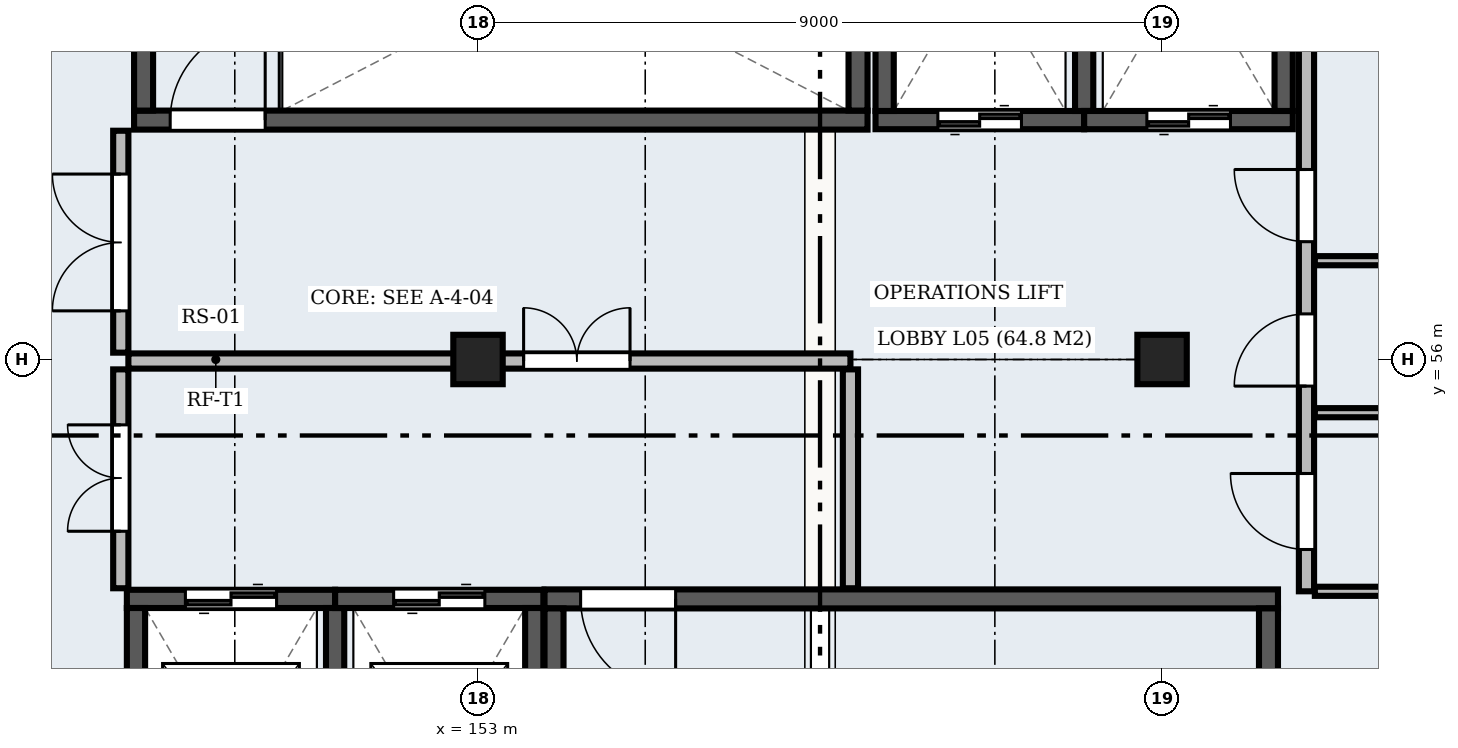
"""IFC4 building model, lengths in metres.
Left out: names, types, materials, properties, quantities, classifications, styles, units other than length and angle.
Written with IfcOpenShell. Run it as: python <this file> out.ifc"""

import sys

from ifc_helpers import new_model, si_unit, direction, frame, frame_2d, origin, origin_2d, place, context, subcontext, project, spatial, rectangle, extrude, element, fill, save


model = new_model("IFC4")
c1 = context("Model", 3, precision=1e-05, world=origin(), true_north=direction((0.0, 1.0)))
c2 = subcontext(c1, "Body", "Model", "MODEL_VIEW")
j1 = project(units=[si_unit("LENGTHUNIT", "METRE"), si_unit("PLANEANGLEUNIT", "RADIAN")], contexts=[c1])
p1 = place(None, origin())
s1 = spatial("IfcSite", under=j1, at=p1, CompositionType="ELEMENT")
p2 = place(p1, origin())
s2 = spatial("IfcBuilding", under=s1, at=p2, CompositionType="ELEMENT")
p3 = place(p2, frame((0.0, 0.0, 22.8)))
s3 = spatial("IfcBuildingStorey", under=s2, at=p3, CompositionType="ELEMENT", Elevation=22.8)
for number, where, z_axis, x_axis in (
    (1, (153.0, 56.0, 0.0), (0.0, 0.0, 1.0), (1.0, 0.0, 0.0)),
    (2, (162.0, 56.0, 0.0), (0.0, 0.0, 1.0), (1.0, 0.0, 0.0)),
):
    element("IfcColumn", number, at=place(p3, frame(where, z_axis=z_axis, x_axis=x_axis)), inside=s3, PredefinedType="COLUMN", context=c2, shape_type="SweptSolid", body=[
        extrude(rectangle(XDim=0.65, YDim=0.65, at=origin_2d()), origin(), (0.0, 0.0, 1.0), 6.58),
    ])
p4 = place(p3, frame((148.475, 59.15, 0.0), z_axis=(0.0, 0.0, 1.0), x_axis=(1.0, 0.0, 0.0)))
e3 = element("IfcWall", 3, at=p4, inside=s3, PredefinedType="SHEAR", context=c2, shape_type="SweptSolid", body=[
    extrude(rectangle(XDim=9.65, YDim=0.25, at=frame_2d((4.825, 0.0))), origin(), (0.0, 0.0, 1.0), 3.89),
])
p5 = place(p4, frame((0.475, 0.0, 0.0)))
e4 = element("IfcOpeningElement", 4, at=p5, cuts=e3, PredefinedType="OPENING", context=c2, shape_type="SweptSolid", body=[
    extrude(rectangle(XDim=1.25, YDim=2.15, at=frame_2d((0.625, 1.075))), frame((0.0, 0.137, 0.0), z_axis=(0.0, -1.0, 0.0), x_axis=(1.0, 0.0, 0.0)), (0.0, 0.0, 1.0), 0.274),
])
for number, where, z_axis, x_axis in (
    (5, (148.6, 63.125, 0.0), (0.0, 0.0, 1.0), (0.0, -1.0, 0.0)),
    (6, (158.0, 59.275, 0.0), (0.0, 0.0, 1.0), (0.0, 1.0, 0.0)),
):
    element("IfcWall", number, at=place(p3, frame(where, z_axis=z_axis, x_axis=x_axis)), inside=s3, PredefinedType="SHEAR", context=c2, shape_type="SweptSolid", body=[
        extrude(rectangle(XDim=3.85, YDim=0.25, at=frame_2d((1.925, 0.0))), origin(), (0.0, 0.0, 1.0), 3.89),
    ])
p6 = place(p3, frame((163.525, 52.85, 0.0), z_axis=(0.0, 0.0, 1.0), x_axis=(-1.0, 0.0, 0.0)))
e7 = element("IfcWall", 7, at=p6, inside=s3, PredefinedType="SHEAR", context=c2, shape_type="SweptSolid", body=[
    extrude(rectangle(XDim=9.65, YDim=0.25, at=frame_2d((4.825, 0.0))), origin(), (0.0, 0.0, 1.0), 3.89),
])
p7 = place(p6, frame((7.925, 0.0, 0.0)))
e8 = element("IfcOpeningElement", 8, at=p7, cuts=e7, PredefinedType="OPENING", context=c2, shape_type="SweptSolid", body=[
    extrude(rectangle(XDim=1.25, YDim=2.15, at=frame_2d((0.625, 1.075))), frame((0.0, 0.137, 0.0), z_axis=(0.0, -1.0, 0.0), x_axis=(1.0, 0.0, 0.0)), (0.0, 0.0, 1.0), 0.274),
])
for number, where, z_axis, x_axis in (
    (9, (154.0, 52.725, 0.0), (0.0, 0.0, 1.0), (0.0, -1.0, 0.0)),
    (10, (163.4, 48.875, 0.0), (0.0, 0.0, 1.0), (0.0, 1.0, 0.0)),
):
    element("IfcWall", number, at=place(p3, frame(where, z_axis=z_axis, x_axis=x_axis)), inside=s3, PredefinedType="SHEAR", context=c2, shape_type="SweptSolid", body=[
        extrude(rectangle(XDim=3.85, YDim=0.25, at=frame_2d((1.925, 0.0))), origin(), (0.0, 0.0, 1.0), 3.89),
    ])
p8 = place(p3, frame((158.23, 59.15, 0.0), z_axis=(0.0, 0.0, 1.0), x_axis=(1.0, 0.0, 0.0)))
e11 = element("IfcWall", 11, at=p8, inside=s3, PredefinedType="SHEAR", context=c2, shape_type="SweptSolid", body=[
    extrude(rectangle(XDim=2.745, YDim=0.24, at=frame_2d((1.373, 0.0))), origin(), (0.0, 0.0, 1.0), 3.89),
])
p9 = place(p8, frame((0.82, 0.0, 0.0)))
e12 = element("IfcOpeningElement", 12, at=p9, cuts=e11, PredefinedType="OPENING", context=c2, shape_type="SweptSolid", body=[
    extrude(rectangle(XDim=1.1, YDim=2.2, at=frame_2d((0.55, 1.1))), frame((0.0, 0.132, 0.0), z_axis=(0.0, -1.0, 0.0), x_axis=(1.0, 0.0, 0.0)), (0.0, 0.0, 1.0), 0.264),
])
for number, where, z_axis, x_axis in (
    (13, (158.35, 63.13, 0.0), (0.0, 0.0, 1.0), (0.0, -1.0, 0.0)),
    (14, (160.975, 59.27, 0.0), (0.0, 0.0, 1.0), (0.0, 1.0, 0.0)),
):
    element("IfcWall", number, at=place(p3, frame(where, z_axis=z_axis, x_axis=x_axis)), inside=s3, PredefinedType="SHEAR", context=c2, shape_type="SweptSolid", body=[
        extrude(rectangle(XDim=3.86, YDim=0.24, at=frame_2d((1.93, 0.0))), origin(), (0.0, 0.0, 1.0), 3.89),
    ])
p10 = place(p3, frame((160.975, 59.15, 0.0), z_axis=(0.0, 0.0, 1.0), x_axis=(1.0, 0.0, 0.0)))
e15 = element("IfcWall", 15, at=p10, inside=s3, PredefinedType="SHEAR", context=c2, shape_type="SweptSolid", body=[
    extrude(rectangle(XDim=2.745, YDim=0.24, at=frame_2d((1.373, 0.0))), origin(), (0.0, 0.0, 1.0), 3.89),
])
p11 = place(p10, frame((0.825, 0.0, 0.0)))
e16 = element("IfcOpeningElement", 16, at=p11, cuts=e15, PredefinedType="OPENING", context=c2, shape_type="SweptSolid", body=[
    extrude(rectangle(XDim=1.1, YDim=2.2, at=frame_2d((0.55, 1.1))), frame((0.0, 0.132, 0.0), z_axis=(0.0, -1.0, 0.0), x_axis=(1.0, 0.0, 0.0)), (0.0, 0.0, 1.0), 0.264),
])
p12 = place(p3, frame((163.6, 59.27, 0.0), z_axis=(0.0, 0.0, 1.0), x_axis=(0.0, 1.0, 0.0)))
e17 = element("IfcWall", 17, at=p12, inside=s3, PredefinedType="SHEAR", context=c2, shape_type="SweptSolid", body=[
    extrude(rectangle(XDim=3.86, YDim=0.24, at=frame_2d((1.93, 0.0))), origin(), (0.0, 0.0, 1.0), 3.89),
])
p13 = place(p3, frame((151.12, 52.85, 0.0), z_axis=(0.0, 0.0, 1.0), x_axis=(-1.0, 0.0, 0.0)))
e18 = element("IfcWall", 18, at=p13, inside=s3, PredefinedType="SHEAR", context=c2, shape_type="SweptSolid", body=[
    extrude(rectangle(XDim=2.74, YDim=0.24, at=frame_2d((1.37, 0.0))), origin(), (0.0, 0.0, 1.0), 3.89),
])
p14 = place(p13, frame((0.77, 0.0, 0.0)))
e19 = element("IfcOpeningElement", 19, at=p14, cuts=e18, PredefinedType="OPENING", context=c2, shape_type="SweptSolid", body=[
    extrude(rectangle(XDim=1.2, YDim=2.2, at=frame_2d((0.6, 1.1))), frame((0.0, 0.132, 0.0), z_axis=(0.0, -1.0, 0.0), x_axis=(1.0, 0.0, 0.0)), (0.0, 0.0, 1.0), 0.264),
])
for number, where, z_axis, x_axis in (
    (20, (148.5, 52.73, 0.0), (0.0, 0.0, 1.0), (0.0, -1.0, 0.0)),
    (21, (151.12, 48.87, 0.0), (0.0, 0.0, 1.0), (0.0, 1.0, 0.0)),
):
    element("IfcWall", number, at=place(p3, frame(where, z_axis=z_axis, x_axis=x_axis)), inside=s3, PredefinedType="SHEAR", context=c2, shape_type="SweptSolid", body=[
        extrude(rectangle(XDim=3.86, YDim=0.24, at=frame_2d((1.93, 0.0))), origin(), (0.0, 0.0, 1.0), 3.89),
    ])
p15 = place(p3, frame((153.86, 52.85, 0.0), z_axis=(0.0, 0.0, 1.0), x_axis=(-1.0, 0.0, 0.0)))
e22 = element("IfcWall", 22, at=p15, inside=s3, PredefinedType="SHEAR", context=c2, shape_type="SweptSolid", body=[
    extrude(rectangle(XDim=2.74, YDim=0.24, at=frame_2d((1.37, 0.0))), origin(), (0.0, 0.0, 1.0), 3.89),
])
p16 = place(p15, frame((0.77, 0.0, 0.0)))
e23 = element("IfcOpeningElement", 23, at=p16, cuts=e22, PredefinedType="OPENING", context=c2, shape_type="SweptSolid", body=[
    extrude(rectangle(XDim=1.2, YDim=2.2, at=frame_2d((0.6, 1.1))), frame((0.0, 0.132, 0.0), z_axis=(0.0, -1.0, 0.0), x_axis=(1.0, 0.0, 0.0)), (0.0, 0.0, 1.0), 0.264),
])
p17 = place(p3, frame((153.74, 48.87, 0.0), z_axis=(0.0, 0.0, 1.0), x_axis=(0.0, 1.0, 0.0)))
e24 = element("IfcWall", 24, at=p17, inside=s3, PredefinedType="SHEAR", context=c2, shape_type="SweptSolid", body=[
    extrude(rectangle(XDim=3.86, YDim=0.24, at=frame_2d((1.93, 0.0))), origin(), (0.0, 0.0, 1.0), 3.89),
])
p18 = place(p3, frame((148.4, 55.98, 0.0), z_axis=(0.0, 0.0, 1.0), x_axis=(1.0, 0.0, 0.0)))
e25 = element("IfcWall", 25, at=p18, inside=s3, PredefinedType="STANDARD", context=c2, shape_type="SweptSolid", body=[
    extrude(rectangle(XDim=9.5, YDim=0.2, at=frame_2d((4.75, 0.0))), origin(), (0.0, 0.0, 1.0), 3.32),
])
p19 = place(p18, frame((5.2, 0.0, 0.0)))
e26 = element("IfcOpeningElement", 26, at=p19, cuts=e25, PredefinedType="OPENING", context=c2, shape_type="SweptSolid", body=[
    extrude(rectangle(XDim=1.4, YDim=2.2, at=frame_2d((0.7, 1.1))), frame((0.0, 0.112, 0.0), z_axis=(0.0, -1.0, 0.0), x_axis=(1.0, 0.0, 0.0)), (0.0, 0.0, 1.0), 0.224),
])
p20 = place(p3, frame((157.9, 52.99, 0.0), z_axis=(0.0, 0.0, 1.0), x_axis=(0.0, 1.0, 0.0)))
e27 = element("IfcWall", 27, at=p20, inside=s3, PredefinedType="STANDARD", context=c2, shape_type="SweptSolid", body=[
    extrude(rectangle(XDim=2.88, YDim=0.2, at=frame_2d((1.44, 0.0))), origin(), (0.0, 0.0, 1.0), 3.89),
])
p21 = place(p3, frame((148.3, 52.99, 0.0), z_axis=(0.0, 0.0, 1.0), x_axis=(0.0, 1.0, 0.0)))
e28 = element("IfcWall", 28, at=p21, inside=s3, PredefinedType="STANDARD", context=c2, shape_type="SweptSolid", body=[
    extrude(rectangle(XDim=2.88, YDim=0.2, at=frame_2d((1.44, 0.0))), origin(), (0.0, 0.0, 1.0), 3.89),
])
p22 = place(p21, frame((0.75, 0.0, 0.0)))
e29 = element("IfcOpeningElement", 29, at=p22, cuts=e28, PredefinedType="OPENING", context=c2, shape_type="SweptSolid", body=[
    extrude(rectangle(XDim=1.4, YDim=2.2, at=frame_2d((0.7, 1.1))), frame((0.0, 0.112, 0.0), z_axis=(0.0, -1.0, 0.0), x_axis=(1.0, 0.0, 0.0)), (0.0, 0.0, 1.0), 0.224),
])
p23 = place(p3, frame((148.3, 56.09, 0.0), z_axis=(0.0, 0.0, 1.0), x_axis=(0.0, 1.0, 0.0)))
e30 = element("IfcWall", 30, at=p23, inside=s3, PredefinedType="STANDARD", context=c2, shape_type="SweptSolid", body=[
    extrude(rectangle(XDim=2.92, YDim=0.2, at=frame_2d((1.46, 0.0))), origin(), (0.0, 0.0, 1.0), 3.89),
])
p24 = place(p23, frame((0.55, 0.0, 0.0)))
e31 = element("IfcOpeningElement", 31, at=p24, cuts=e30, PredefinedType="OPENING", context=c2, shape_type="SweptSolid", body=[
    extrude(rectangle(XDim=1.8, YDim=2.2, at=frame_2d((0.9, 1.1))), frame((0.0, 0.112, 0.0), z_axis=(0.0, -1.0, 0.0), x_axis=(1.0, 0.0, 0.0)), (0.0, 0.0, 1.0), 0.224),
])
p25 = place(p3, frame((163.9, 52.95, 0.0), z_axis=(0.0, 0.0, 1.0), x_axis=(0.0, 1.0, 0.0)))
e32 = element("IfcWall", 32, at=p25, inside=s3, PredefinedType="STANDARD", context=c2, shape_type="SweptSolid", body=[
    extrude(rectangle(XDim=10.3, YDim=0.2, at=frame_2d((5.15, 0.0))), origin(), (0.0, 0.0, 1.0), 3.89),
])
p26 = place(p25, frame((0.55, 0.0, 0.0)))
e33 = element("IfcOpeningElement", 33, at=p26, cuts=e32, PredefinedType="OPENING", context=c2, shape_type="SweptSolid", body=[
    extrude(rectangle(XDim=1.0, YDim=2.1, at=frame_2d((0.5, 1.05))), frame((0.0, 0.112, 0.0), z_axis=(0.0, -1.0, 0.0), x_axis=(1.0, 0.0, 0.0)), (0.0, 0.0, 1.0), 0.224),
])
p27 = place(p25, frame((2.7, 0.0, 0.0)))
e34 = element("IfcOpeningElement", 34, at=p27, cuts=e32, PredefinedType="OPENING", context=c2, shape_type="SweptSolid", body=[
    extrude(rectangle(XDim=0.95, YDim=2.1, at=frame_2d((0.475, 1.05))), frame((0.0, 0.112, 0.0), z_axis=(0.0, -1.0, 0.0), x_axis=(1.0, 0.0, 0.0)), (0.0, 0.0, 1.0), 0.224),
])
p28 = place(p25, frame((4.6, 0.0, 0.0)))
e35 = element("IfcOpeningElement", 35, at=p28, cuts=e32, PredefinedType="OPENING", context=c2, shape_type="SweptSolid", body=[
    extrude(rectangle(XDim=0.95, YDim=2.1, at=frame_2d((0.475, 1.05))), frame((0.0, 0.112, 0.0), z_axis=(0.0, -1.0, 0.0), x_axis=(1.0, 0.0, 0.0)), (0.0, 0.0, 1.0), 0.224),
])
for number, where, z_axis, x_axis in (
    (36, (164.01, 52.95, 0.0), (0.0, 0.0, 1.0), (1.0, 0.0, 0.0)),
    (37, (164.01, 55.3, 0.0), (0.0, 0.0, 1.0), (1.0, 0.0, 0.0)),
    (38, (164.01, 57.3, 0.0), (0.0, 0.0, 1.0), (1.0, 0.0, 0.0)),
):
    element("IfcWall", number, at=place(p3, frame(where, z_axis=z_axis, x_axis=x_axis)), inside=s3, PredefinedType="STANDARD", context=c2, shape_type="SweptSolid", body=[
        extrude(rectangle(XDim=6.835, YDim=0.12, at=frame_2d((3.417, 0.0))), origin(), (0.0, 0.0, 1.0), 3.89),
    ])
p29 = place(p5, origin())
e39 = element("IfcDoor", 39, at=p29, inside=s3, OperationType="SINGLE_SWING_RIGHT", PredefinedType="DOOR", context=c2, shape_type="SweptSolid", body=[
    extrude(rectangle(XDim=1.25, YDim=2.15, at=frame_2d((0.625, 1.075))), frame((0.0, 0.025, 0.0), z_axis=(0.0, -1.0, 0.0), x_axis=(1.0, 0.0, 0.0)), (0.0, 0.0, 1.0), 0.05),
])
fill(e4, e39)
p30 = place(p7, origin())
e40 = element("IfcDoor", 40, at=p30, inside=s3, OperationType="SINGLE_SWING_LEFT", PredefinedType="DOOR", context=c2, shape_type="SweptSolid", body=[
    extrude(rectangle(XDim=1.25, YDim=2.15, at=frame_2d((0.625, 1.075))), frame((0.0, 0.025, 0.0), z_axis=(0.0, -1.0, 0.0), x_axis=(1.0, 0.0, 0.0)), (0.0, 0.0, 1.0), 0.05),
])
fill(e8, e40)
p31 = place(p9, origin())
e41 = element("IfcDoor", 41, at=p31, inside=s3, OperationType="DOUBLE_DOOR_SLIDING", PredefinedType="DOOR", context=c2, shape_type="SweptSolid", body=[
    extrude(rectangle(XDim=1.1, YDim=2.2, at=frame_2d((0.55, 1.1))), frame((0.0, 0.025, 0.0), z_axis=(0.0, -1.0, 0.0), x_axis=(1.0, 0.0, 0.0)), (0.0, 0.0, 1.0), 0.05),
])
fill(e12, e41)
p32 = place(p11, origin())
e42 = element("IfcDoor", 42, at=p32, inside=s3, OperationType="DOUBLE_DOOR_SLIDING", PredefinedType="DOOR", context=c2, shape_type="SweptSolid", body=[
    extrude(rectangle(XDim=1.1, YDim=2.2, at=frame_2d((0.55, 1.1))), frame((0.0, 0.025, 0.0), z_axis=(0.0, -1.0, 0.0), x_axis=(1.0, 0.0, 0.0)), (0.0, 0.0, 1.0), 0.05),
])
fill(e16, e42)
p33 = place(p14, origin())
e43 = element("IfcDoor", 43, at=p33, inside=s3, OperationType="DOUBLE_DOOR_SLIDING", PredefinedType="DOOR", context=c2, shape_type="SweptSolid", body=[
    extrude(rectangle(XDim=1.2, YDim=2.2, at=frame_2d((0.6, 1.1))), frame((0.0, 0.025, 0.0), z_axis=(0.0, -1.0, 0.0), x_axis=(1.0, 0.0, 0.0)), (0.0, 0.0, 1.0), 0.05),
])
fill(e19, e43)
p34 = place(p16, origin())
e44 = element("IfcDoor", 44, at=p34, inside=s3, OperationType="DOUBLE_DOOR_SLIDING", PredefinedType="DOOR", context=c2, shape_type="SweptSolid", body=[
    extrude(rectangle(XDim=1.2, YDim=2.2, at=frame_2d((0.6, 1.1))), frame((0.0, 0.025, 0.0), z_axis=(0.0, -1.0, 0.0), x_axis=(1.0, 0.0, 0.0)), (0.0, 0.0, 1.0), 0.05),
])
fill(e23, e44)
p35 = place(p19, origin())
e45 = element("IfcDoor", 45, at=p35, inside=s3, OperationType="DOUBLE_DOOR_SINGLE_SWING", PredefinedType="DOOR", context=c2, shape_type="SweptSolid", body=[
    extrude(rectangle(XDim=1.4, YDim=2.2, at=frame_2d((0.7, 1.1))), frame((0.0, 0.025, 0.0), z_axis=(0.0, -1.0, 0.0), x_axis=(1.0, 0.0, 0.0)), (0.0, 0.0, 1.0), 0.05),
])
fill(e26, e45)
p36 = place(p22, origin())
e46 = element("IfcDoor", 46, at=p36, inside=s3, OperationType="DOUBLE_DOOR_SINGLE_SWING", PredefinedType="DOOR", context=c2, shape_type="SweptSolid", body=[
    extrude(rectangle(XDim=1.4, YDim=2.2, at=frame_2d((0.7, 1.1))), frame((0.0, 0.025, 0.0), z_axis=(0.0, -1.0, 0.0), x_axis=(1.0, 0.0, 0.0)), (0.0, 0.0, 1.0), 0.05),
])
fill(e29, e46)
p37 = place(p24, origin())
e47 = element("IfcDoor", 47, at=p37, inside=s3, OperationType="DOUBLE_DOOR_SINGLE_SWING", PredefinedType="DOOR", context=c2, shape_type="SweptSolid", body=[
    extrude(rectangle(XDim=1.8, YDim=2.2, at=frame_2d((0.9, 1.1))), frame((0.0, 0.025, 0.0), z_axis=(0.0, -1.0, 0.0), x_axis=(1.0, 0.0, 0.0)), (0.0, 0.0, 1.0), 0.05),
])
fill(e31, e47)
p38 = place(p26, origin())
e48 = element("IfcDoor", 48, at=p38, inside=s3, OperationType="SINGLE_SWING_RIGHT", PredefinedType="DOOR", context=c2, shape_type="SweptSolid", body=[
    extrude(rectangle(XDim=1.0, YDim=2.1, at=frame_2d((0.5, 1.05))), frame((0.0, 0.025, 0.0), z_axis=(0.0, -1.0, 0.0), x_axis=(1.0, 0.0, 0.0)), (0.0, 0.0, 1.0), 0.05),
])
fill(e33, e48)
p39 = place(p27, origin())
e49 = element("IfcDoor", 49, at=p39, inside=s3, OperationType="SINGLE_SWING_LEFT", PredefinedType="DOOR", context=c2, shape_type="SweptSolid", body=[
    extrude(rectangle(XDim=0.95, YDim=2.1, at=frame_2d((0.475, 1.05))), frame((0.0, 0.025, 0.0), z_axis=(0.0, -1.0, 0.0), x_axis=(1.0, 0.0, 0.0)), (0.0, 0.0, 1.0), 0.05),
])
fill(e34, e49)
p40 = place(p28, origin())
e50 = element("IfcDoor", 50, at=p40, inside=s3, OperationType="SINGLE_SWING_RIGHT", PredefinedType="DOOR", context=c2, shape_type="SweptSolid", body=[
    extrude(rectangle(XDim=0.95, YDim=2.1, at=frame_2d((0.475, 1.05))), frame((0.0, 0.025, 0.0), z_axis=(0.0, -1.0, 0.0), x_axis=(1.0, 0.0, 0.0)), (0.0, 0.0, 1.0), 0.05),
])
fill(e35, e50)
save(model, sys.argv[1])
